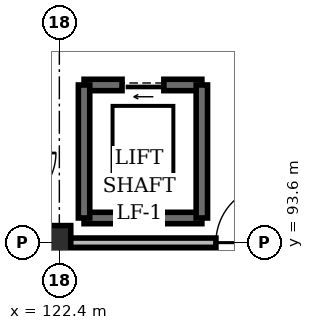
"""IFC4 building model, lengths in metres.
Left out: names, types, materials, properties, quantities, classifications, styles, units other than length and angle.
Written with IfcOpenShell. Run it as: python <this file> out.ifc"""

import sys

from ifc_helpers import new_model, si_unit, direction, frame, frame_2d, origin, origin_2d, place, context, subcontext, project, spatial, rectangle, extrude, element, fill, save


model = new_model("IFC4")
c1 = context("Model", 3, precision=1e-05, world=origin(), true_north=direction((0.0, 1.0)))
c2 = subcontext(c1, "Body", "Model", "MODEL_VIEW")
j1 = project(units=[si_unit("LENGTHUNIT", "METRE"), si_unit("PLANEANGLEUNIT", "RADIAN")], contexts=[c1])
p1 = place(None, origin())
s1 = spatial("IfcSite", under=j1, at=p1, CompositionType="ELEMENT")
p2 = place(p1, origin())
s2 = spatial("IfcBuilding", under=s1, at=p2, CompositionType="ELEMENT")
p3 = place(p2, origin())
s3 = spatial("IfcBuildingStorey", under=s2, at=p3, CompositionType="ELEMENT", Elevation=0.0)
p4 = place(p3, frame((122.4, 93.6, 0.0), z_axis=(0.0, 0.0, 1.0), x_axis=(1.0, 0.0, 0.0)))
e1 = element("IfcColumn", 1, at=p4, inside=s3, PredefinedType="PILASTER", context=c2, shape_type="SweptSolid", body=[
    extrude(rectangle(XDim=0.6, YDim=0.9, at=origin_2d()), origin(), (0.0, 0.0, 1.0), 6.0),
])
p5 = place(p3, frame((123.05, 94.25, 0.0), z_axis=(0.0, 0.0, 1.0), x_axis=(1.0, 0.0, 0.0)))
e2 = element("IfcWall", 2, at=p5, inside=s3, PredefinedType="SHEAR", context=c2, shape_type="SweptSolid", body=[
    extrude(rectangle(XDim=3.1, YDim=0.3, at=frame_2d((1.55, 0.0))), origin(), (0.0, 0.0, 1.0), 5.715),
])
p6 = place(p3, frame((126.15, 97.75, 0.0), z_axis=(0.0, 0.0, 1.0), x_axis=(-1.0, 0.0, 0.0)))
e3 = element("IfcWall", 3, at=p6, inside=s3, PredefinedType="SHEAR", context=c2, shape_type="SweptSolid", body=[
    extrude(rectangle(XDim=3.1, YDim=0.3, at=frame_2d((1.55, 0.0))), origin(), (0.0, 0.0, 1.0), 5.715),
])
p7 = place(p6, frame((1.0, 0.0, 0.0)))
e4 = element("IfcOpeningElement", 4, at=p7, cuts=e3, PredefinedType="OPENING", context=c2, shape_type="SweptSolid", body=[
    extrude(rectangle(XDim=1.1, YDim=2.22, at=frame_2d((0.55, 1.11))), frame((0.0, 0.16, 0.0), z_axis=(0.0, -1.0, 0.0), x_axis=(1.0, 0.0, 0.0)), (0.0, 0.0, 1.0), 0.32),
])
for number, where, z_axis, x_axis in (
    (5, (123.05, 97.75, 0.0), (0.0, 0.0, 1.0), (0.0, -1.0, 0.0)),
    (6, (126.15, 94.25, 0.0), (0.0, 0.0, 1.0), (0.0, 1.0, 0.0)),
):
    element("IfcWall", number, at=place(p3, frame(where, z_axis=z_axis, x_axis=x_axis)), inside=s3, PredefinedType="SHEAR", context=c2, shape_type="SweptSolid", body=[
        extrude(rectangle(XDim=3.5, YDim=0.3, at=frame_2d((1.75, 0.0))), origin(), (0.0, 0.0, 1.0), 5.715),
    ])
p8 = place(p3, frame((115.2, 93.6, 0.0), z_axis=(0.0, 0.0, 1.0), x_axis=(1.0, 0.0, 0.0)))
e7 = element("IfcWall", 7, at=p8, inside=s3, PredefinedType="STANDARD", context=c2, shape_type="SweptSolid", body=[
    extrude(rectangle(XDim=21.6, YDim=0.245, at=frame_2d((10.8, 0.0))), origin(), (0.0, 0.0, 1.0), 5.022),
])
p9 = place(p8, frame((11.32, 0.0, 0.0)))
e8 = element("IfcOpeningElement", 8, at=p9, cuts=e7, PredefinedType="OPENING", context=c2, shape_type="SweptSolid", body=[
    extrude(rectangle(XDim=1.52, YDim=2.26, at=frame_2d((0.76, 1.13))), frame((0.0, 0.133, 0.0), z_axis=(0.0, -1.0, 0.0), x_axis=(1.0, 0.0, 0.0)), (0.0, 0.0, 1.0), 0.265),
])
p10 = place(p7, origin())
e9 = element("IfcDoor", 9, at=p10, inside=s3, OperationType="SLIDING_TO_LEFT", PredefinedType="DOOR", context=c2, shape_type="SweptSolid", body=[
    extrude(rectangle(XDim=1.1, YDim=2.22, at=frame_2d((0.55, 1.11))), frame((0.0, 0.025, 0.0), z_axis=(0.0, -1.0, 0.0), x_axis=(1.0, 0.0, 0.0)), (0.0, 0.0, 1.0), 0.05),
])
fill(e4, e9)
p11 = place(p9, origin())
e10 = element("IfcDoor", 10, at=p11, inside=s3, OperationType="SINGLE_SWING_RIGHT", PredefinedType="DOOR", context=c2, shape_type="SweptSolid", body=[
    extrude(rectangle(XDim=1.52, YDim=2.26, at=frame_2d((0.76, 1.13))), frame((0.0, 0.025, 0.0), z_axis=(0.0, -1.0, 0.0), x_axis=(1.0, 0.0, 0.0)), (0.0, 0.0, 1.0), 0.05),
])
fill(e8, e10)
save(model, sys.argv[1])
